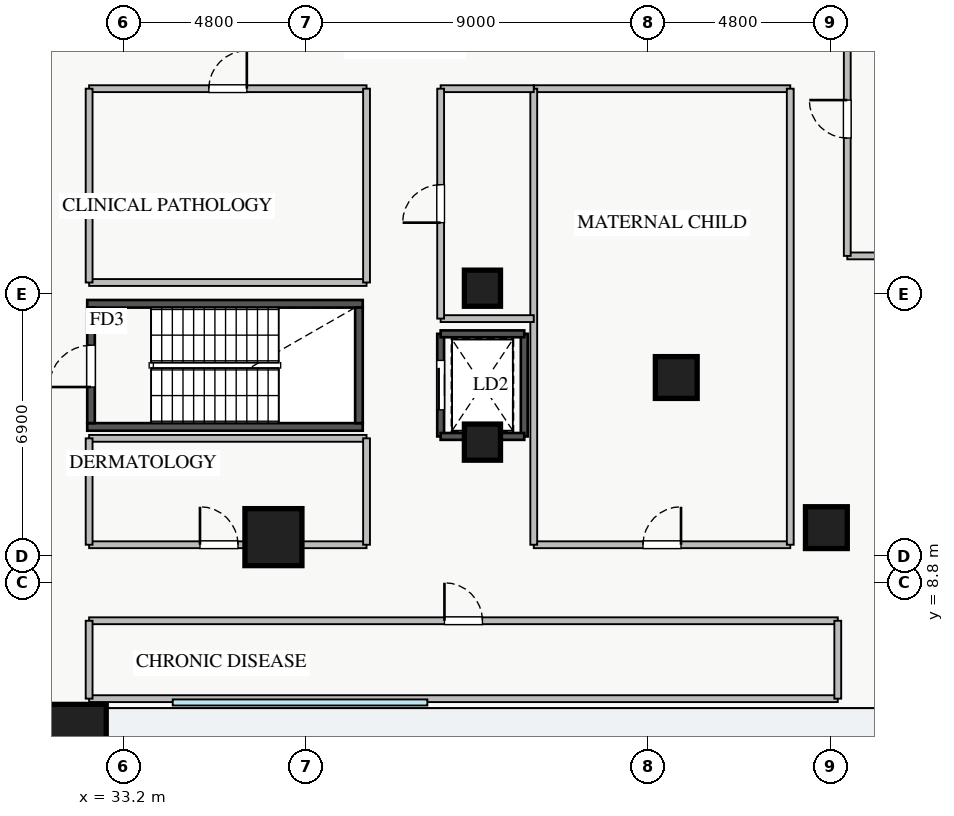
"""IFC4 building model, lengths in metres.
Left out: names, types, materials, properties, quantities, classifications, styles, units other than length and angle.
Written with IfcOpenShell. Run it as: python <this file> out.ifc"""

import sys

from ifc_helpers import new_model, si_unit, direction, frame, frame_2d, origin, origin_2d, place, context, subcontext, project, spatial, rectangle, extrude, source, transform, mapped, element, fill, save


model = new_model("IFC4")
c1 = context("Model", 3, precision=1e-05, world=origin(), true_north=direction((0.0, 1.0)))
c2 = subcontext(c1, "Body", "Model", "MODEL_VIEW")
j1 = project(units=[si_unit("LENGTHUNIT", "METRE"), si_unit("PLANEANGLEUNIT", "RADIAN")], contexts=[c1])
p1 = place(None, origin())
s1 = spatial("IfcSite", under=j1, at=p1, CompositionType="ELEMENT")
p2 = place(p1, origin())
s2 = spatial("IfcBuilding", under=s1, at=p2, CompositionType="ELEMENT")
p3 = place(p2, frame((0.0, 0.0, 13.8)))
s3 = spatial("IfcBuildingStorey", under=s2, at=p3, CompositionType="ELEMENT", Elevation=13.8)
p4 = place(p3, frame((41.55, 12.65, 0.0), z_axis=(0.0, 0.0, 1.0), x_axis=(0.0, 1.0, 0.0)))
e1 = element("IfcWall", 1, at=p4, inside=s3, PredefinedType="SHEAR", context=c2, shape_type="SweptSolid", body=[
    extrude(rectangle(XDim=2.7, YDim=0.18, at=frame_2d((1.35, 0.0))), origin(), (0.0, 0.0, 1.0), 4.15),
])
p5 = place(p4, frame((0.7, 0.0, 0.0)))
e2 = element("IfcOpeningElement", 2, at=p5, cuts=e1, PredefinedType="OPENING", context=c2, shape_type="SweptSolid", body=[
    extrude(rectangle(XDim=1.3, YDim=2.05, at=frame_2d((0.65, 1.025))), frame((0.0, 0.1, 0.0), z_axis=(0.0, -1.0, 0.0), x_axis=(1.0, 0.0, 0.0)), (0.0, 0.0, 1.0), 0.2),
])
p6 = place(p3, frame((43.75, 12.65, 0.0), z_axis=(0.0, 0.0, 1.0), x_axis=(0.0, 1.0, 0.0)))
e3 = element("IfcWall", 3, at=p6, inside=s3, PredefinedType="SHEAR", context=c2, shape_type="SweptSolid", body=[
    extrude(rectangle(XDim=2.7, YDim=0.18, at=frame_2d((1.35, 0.0))), origin(), (0.0, 0.0, 1.0), 4.15),
])
for number, where, z_axis, x_axis in (
    (4, (41.55, 12.65, 0.0), (0.0, 0.0, 1.0), (1.0, 0.0, 0.0)),
    (5, (41.55, 15.35, 0.0), (0.0, 0.0, 1.0), (1.0, 0.0, 0.0)),
):
    element("IfcWall", number, at=place(p3, frame(where, z_axis=z_axis, x_axis=x_axis)), inside=s3, PredefinedType="SHEAR", context=c2, shape_type="SweptSolid", body=[
        extrude(rectangle(XDim=2.2, YDim=0.18, at=frame_2d((1.1, 0.0))), origin(), (0.0, 0.0, 1.0), 4.15),
    ])
for number, where, z_axis, x_axis in (
    (6, (32.25, 12.9, 0.0), (0.0, 0.0, 1.0), (1.0, 0.0, 0.0)),
    (7, (32.25, 16.14, 0.0), (0.0, 0.0, 1.0), (1.0, 0.0, 0.0)),
):
    element("IfcWall", number, at=place(p3, frame(where, z_axis=z_axis, x_axis=x_axis)), inside=s3, PredefinedType="SHEAR", context=c2, shape_type="SweptSolid", body=[
        extrude(rectangle(XDim=7.25, YDim=0.2, at=frame_2d((3.625, 0.0))), origin(), (0.0, 0.0, 1.0), 4.4),
    ])
p7 = place(p3, frame((32.35, 13.0, 0.0), z_axis=(0.0, 0.0, 1.0), x_axis=(0.0, 1.0, 0.0)))
e8 = element("IfcWall", 8, at=p7, inside=s3, PredefinedType="SHEAR", context=c2, shape_type="SweptSolid", body=[
    extrude(rectangle(XDim=3.04, YDim=0.2, at=frame_2d((1.52, 0.0))), origin(), (0.0, 0.0, 1.0), 4.4),
])
p8 = place(p7, frame((0.95, 0.0, 0.0)))
e9 = element("IfcOpeningElement", 9, at=p8, cuts=e8, PredefinedType="OPENING", context=c2, shape_type="SweptSolid", body=[
    extrude(rectangle(XDim=1.1, YDim=2.05, at=frame_2d((0.55, 1.025))), frame((0.0, 0.11, 0.0), z_axis=(0.0, -1.0, 0.0), x_axis=(1.0, 0.0, 0.0)), (0.0, 0.0, 1.0), 0.22),
])
p9 = place(p3, frame((39.4, 13.0, 0.0), z_axis=(0.0, 0.0, 1.0), x_axis=(0.0, 1.0, 0.0)))
e10 = element("IfcWall", 10, at=p9, inside=s3, PredefinedType="SHEAR", context=c2, shape_type="SweptSolid", body=[
    extrude(rectangle(XDim=3.04, YDim=0.2, at=frame_2d((1.52, 0.0))), origin(), (0.0, 0.0, 1.0), 4.4),
])
m1 = source(origin(), c2, "Body", "SweptSolid", [
    extrude(rectangle(XDim=1.5, YDim=1.5, at=origin_2d()), origin(), (0.0, 0.0, 1.0), 4.4),
])
for number, where, z_axis, x_axis in (
    (11, (32.0, 4.85, 0.0), (0.0, 0.0, 1.0), (1.0, 0.0, 0.0)),
    (12, (37.15, 10.0, 0.0), (0.0, 0.0, 1.0), (1.0, 0.0, 0.0)),
):
    element("IfcColumn", number, at=place(p3, frame(where, z_axis=z_axis, x_axis=x_axis)), inside=s3, PredefinedType="COLUMN", context=c2, shape_type="MappedRepresentation", body=[
        mapped(m1, transform((0.0, 0.0, 0.0), x_axis=(1.0, 0.0, 0.0), y_axis=(0.0, 1.0, 0.0), z_axis=(0.0, 0.0, 1.0), scale=1.0)),
    ])
m2 = source(origin(), c2, "Body", "SweptSolid", [
    extrude(rectangle(XDim=1.1, YDim=1.1, at=origin_2d()), origin(), (0.0, 0.0, 1.0), 4.4),
])
for number, where, z_axis, x_axis in (
    (13, (51.7, 10.25, 0.0), (0.0, 0.0, 1.0), (1.0, 0.0, 0.0)),
    (14, (47.75, 14.2, 0.0), (0.0, 0.0, 1.0), (1.0, 0.0, 0.0)),
):
    element("IfcColumn", number, at=place(p3, frame(where, z_axis=z_axis, x_axis=x_axis)), inside=s3, PredefinedType="COLUMN", context=c2, shape_type="MappedRepresentation", body=[
        mapped(m2, transform((0.0, 0.0, 0.0), x_axis=(1.0, 0.0, 0.0), y_axis=(0.0, 1.0, 0.0), z_axis=(0.0, 0.0, 1.0), scale=1.0)),
    ])
m3 = source(origin(), c2, "Body", "SweptSolid", [
    extrude(rectangle(XDim=0.95, YDim=0.95, at=origin_2d()), origin(), (0.0, 0.0, 1.0), 4.4),
])
for number, where, z_axis, x_axis in (
    (15, (42.65, 12.5, 0.0), (0.0, 0.0, 1.0), (1.0, 0.0, 0.0)),
    (16, (42.65, 16.55, 0.0), (0.0, 0.0, 1.0), (1.0, 0.0, 0.0)),
):
    element("IfcColumn", number, at=place(p3, frame(where, z_axis=z_axis, x_axis=x_axis)), inside=s3, PredefinedType="COLUMN", context=c2, shape_type="MappedRepresentation", body=[
        mapped(m3, transform((0.0, 0.0, 0.0), x_axis=(1.0, 0.0, 0.0), y_axis=(0.0, 1.0, 0.0), z_axis=(0.0, 0.0, 1.0), scale=1.0)),
    ])
p10 = place(p3, frame((32.3, 16.7, 0.0), z_axis=(0.0, 0.0, 1.0), x_axis=(1.0, 0.0, 0.0)))
e17 = element("IfcWall", 17, at=p10, inside=s3, PredefinedType="PARTITIONING", context=c2, shape_type="SweptSolid", body=[
    extrude(rectangle(XDim=7.3, YDim=0.18, at=frame_2d((3.65, 0.0))), origin(), (0.0, 0.0, 1.0), 3.445),
])
p11 = place(p3, frame((32.3, 21.8, 0.0), z_axis=(0.0, 0.0, 1.0), x_axis=(1.0, 0.0, 0.0)))
e18 = element("IfcWall", 18, at=p11, inside=s3, PredefinedType="PARTITIONING", context=c2, shape_type="SweptSolid", body=[
    extrude(rectangle(XDim=7.3, YDim=0.18, at=frame_2d((3.65, 0.0))), origin(), (0.0, 0.0, 1.0), 4.15),
])
p12 = place(p11, frame((3.15, 0.0, 0.0)))
e19 = element("IfcOpeningElement", 19, at=p12, cuts=e18, PredefinedType="OPENING", context=c2, shape_type="SweptSolid", body=[
    extrude(rectangle(XDim=1.0, YDim=2.05, at=frame_2d((0.5, 1.025))), frame((0.0, 0.1, 0.0), z_axis=(0.0, -1.0, 0.0), x_axis=(1.0, 0.0, 0.0)), (0.0, 0.0, 1.0), 0.2),
])
for number, where, z_axis, x_axis in (
    (20, (32.3, 16.7, 0.0), (0.0, 0.0, 1.0), (0.0, 1.0, 0.0)),
    (21, (39.6, 16.7, 0.0), (0.0, 0.0, 1.0), (0.0, 1.0, 0.0)),
):
    element("IfcWall", number, at=place(p3, frame(where, z_axis=z_axis, x_axis=x_axis)), inside=s3, PredefinedType="PARTITIONING", context=c2, shape_type="SweptSolid", body=[
        extrude(rectangle(XDim=5.1, YDim=0.18, at=frame_2d((2.55, 0.0))), origin(), (0.0, 0.0, 1.0), 4.15),
    ])
p13 = place(p3, frame((32.3, 9.8, 0.0), z_axis=(0.0, 0.0, 1.0), x_axis=(1.0, 0.0, 0.0)))
e22 = element("IfcWall", 22, at=p13, inside=s3, PredefinedType="PARTITIONING", context=c2, shape_type="SweptSolid", body=[
    extrude(rectangle(XDim=7.3, YDim=0.18, at=frame_2d((3.65, 0.0))), origin(), (0.0, 0.0, 1.0), 4.15),
])
p14 = place(p13, frame((2.917, 0.0, 0.0)))
e23 = element("IfcOpeningElement", 23, at=p14, cuts=e22, PredefinedType="OPENING", context=c2, shape_type="SweptSolid", body=[
    extrude(rectangle(XDim=1.0, YDim=2.05, at=frame_2d((0.5, 1.025))), frame((0.0, 0.1, 0.0), z_axis=(0.0, -1.0, 0.0), x_axis=(1.0, 0.0, 0.0)), (0.0, 0.0, 1.0), 0.2),
])
p15 = place(p3, frame((32.3, 12.6, 0.0), z_axis=(0.0, 0.0, 1.0), x_axis=(1.0, 0.0, 0.0)))
e24 = element("IfcWall", 24, at=p15, inside=s3, PredefinedType="PARTITIONING", context=c2, shape_type="SweptSolid", body=[
    extrude(rectangle(XDim=7.3, YDim=0.18, at=frame_2d((3.65, 0.0))), origin(), (0.0, 0.0, 1.0), 3.445),
])
for number, where, z_axis, x_axis in (
    (25, (32.3, 9.8, 0.0), (0.0, 0.0, 1.0), (0.0, 1.0, 0.0)),
    (26, (39.6, 9.8, 0.0), (0.0, 0.0, 1.0), (0.0, 1.0, 0.0)),
):
    element("IfcWall", number, at=place(p3, frame(where, z_axis=z_axis, x_axis=x_axis)), inside=s3, PredefinedType="PARTITIONING", context=c2, shape_type="SweptSolid", body=[
        extrude(rectangle(XDim=2.8, YDim=0.18, at=frame_2d((1.4, 0.0))), origin(), (0.0, 0.0, 1.0), 4.15),
    ])
p16 = place(p3, frame((44.0, 9.8, 0.0), z_axis=(0.0, 0.0, 1.0), x_axis=(1.0, 0.0, 0.0)))
e27 = element("IfcWall", 27, at=p16, inside=s3, PredefinedType="PARTITIONING", context=c2, shape_type="SweptSolid", body=[
    extrude(rectangle(XDim=6.75, YDim=0.18, at=frame_2d((3.375, 0.0))), origin(), (0.0, 0.0, 1.0), 4.15),
])
p17 = place(p16, frame((2.875, 0.0, 0.0)))
e28 = element("IfcOpeningElement", 28, at=p17, cuts=e27, PredefinedType="OPENING", context=c2, shape_type="SweptSolid", body=[
    extrude(rectangle(XDim=1.0, YDim=2.05, at=frame_2d((0.5, 1.025))), frame((0.0, 0.1, 0.0), z_axis=(0.0, -1.0, 0.0), x_axis=(1.0, 0.0, 0.0)), (0.0, 0.0, 1.0), 0.2),
])
p18 = place(p3, frame((44.0, 21.8, 0.0), z_axis=(0.0, 0.0, 1.0), x_axis=(1.0, 0.0, 0.0)))
e29 = element("IfcWall", 29, at=p18, inside=s3, PredefinedType="PARTITIONING", context=c2, shape_type="SweptSolid", body=[
    extrude(rectangle(XDim=6.75, YDim=0.18, at=frame_2d((3.375, 0.0))), origin(), (0.0, 0.0, 1.0), 4.15),
])
for number, where, z_axis, x_axis in (
    (30, (44.0, 9.8, 0.0), (0.0, 0.0, 1.0), (0.0, 1.0, 0.0)),
    (31, (50.75, 9.8, 0.0), (0.0, 0.0, 1.0), (0.0, 1.0, 0.0)),
):
    element("IfcWall", number, at=place(p3, frame(where, z_axis=z_axis, x_axis=x_axis)), inside=s3, PredefinedType="PARTITIONING", context=c2, shape_type="SweptSolid", body=[
        extrude(rectangle(XDim=12.0, YDim=0.18, at=frame_2d((6.0, 0.0))), origin(), (0.0, 0.0, 1.0), 4.15),
    ])
for number, where, z_axis, x_axis in (
    (32, (41.55, 15.75, 0.0), (0.0, 0.0, 1.0), (1.0, 0.0, 0.0)),
    (33, (41.55, 21.8, 0.0), (0.0, 0.0, 1.0), (1.0, 0.0, 0.0)),
):
    element("IfcWall", number, at=place(p3, frame(where, z_axis=z_axis, x_axis=x_axis)), inside=s3, PredefinedType="PARTITIONING", context=c2, shape_type="SweptSolid", body=[
        extrude(rectangle(XDim=2.45, YDim=0.18, at=frame_2d((1.225, 0.0))), origin(), (0.0, 0.0, 1.0), 4.15),
    ])
p19 = place(p3, frame((41.55, 15.75, 0.0), z_axis=(0.0, 0.0, 1.0), x_axis=(0.0, 1.0, 0.0)))
e34 = element("IfcWall", 34, at=p19, inside=s3, PredefinedType="PARTITIONING", context=c2, shape_type="SweptSolid", body=[
    extrude(rectangle(XDim=6.05, YDim=0.18, at=frame_2d((3.025, 0.0))), origin(), (0.0, 0.0, 1.0), 4.15),
])
p20 = place(p19, frame((2.525, 0.0, 0.0)))
e35 = element("IfcOpeningElement", 35, at=p20, cuts=e34, PredefinedType="OPENING", context=c2, shape_type="SweptSolid", body=[
    extrude(rectangle(XDim=1.0, YDim=2.05, at=frame_2d((0.5, 1.025))), frame((0.0, 0.1, 0.0), z_axis=(0.0, -1.0, 0.0), x_axis=(1.0, 0.0, 0.0)), (0.0, 0.0, 1.0), 0.2),
])
p21 = place(p3, frame((52.25, 17.4, 0.0), z_axis=(0.0, 0.0, 1.0), x_axis=(1.0, 0.0, 0.0)))
e36 = element("IfcWall", 36, at=p21, inside=s3, PredefinedType="PARTITIONING", context=c2, shape_type="SweptSolid", body=[
    extrude(rectangle(XDim=2.05, YDim=0.18, at=frame_2d((1.025, 0.0))), origin(), (0.0, 0.0, 1.0), 4.15),
])
p22 = place(p3, frame((52.25, 17.4, 0.0), z_axis=(0.0, 0.0, 1.0), x_axis=(0.0, 1.0, 0.0)))
e37 = element("IfcWall", 37, at=p22, inside=s3, PredefinedType="PARTITIONING", context=c2, shape_type="SweptSolid", body=[
    extrude(rectangle(XDim=7.2, YDim=0.18, at=frame_2d((3.6, 0.0))), origin(), (0.0, 0.0, 1.0), 4.15),
])
p23 = place(p22, frame((3.1, 0.0, 0.0)))
e38 = element("IfcOpeningElement", 38, at=p23, cuts=e37, PredefinedType="OPENING", context=c2, shape_type="SweptSolid", body=[
    extrude(rectangle(XDim=1.0, YDim=2.05, at=frame_2d((0.5, 1.025))), frame((0.0, 0.1, 0.0), z_axis=(0.0, -1.0, 0.0), x_axis=(1.0, 0.0, 0.0)), (0.0, 0.0, 1.0), 0.2),
])
p24 = place(p3, frame((32.3, 5.75, 0.0), z_axis=(0.0, 0.0, 1.0), x_axis=(1.0, 0.0, 0.0)))
e39 = element("IfcWall", 39, at=p24, inside=s3, PredefinedType="PARTITIONING", context=c2, shape_type="SweptSolid", body=[
    extrude(rectangle(XDim=19.7, YDim=0.18, at=frame_2d((9.85, 0.0))), origin(), (0.0, 0.0, 1.0), 4.15),
])
p25 = place(p3, frame((32.3, 7.8, 0.0), z_axis=(0.0, 0.0, 1.0), x_axis=(1.0, 0.0, 0.0)))
e40 = element("IfcWall", 40, at=p25, inside=s3, PredefinedType="PARTITIONING", context=c2, shape_type="SweptSolid", body=[
    extrude(rectangle(XDim=19.7, YDim=0.18, at=frame_2d((9.85, 0.0))), origin(), (0.0, 0.0, 1.0), 4.15),
])
p26 = place(p25, frame((9.35, 0.0, 0.0)))
e41 = element("IfcOpeningElement", 41, at=p26, cuts=e40, PredefinedType="OPENING", context=c2, shape_type="SweptSolid", body=[
    extrude(rectangle(XDim=1.0, YDim=2.05, at=frame_2d((0.5, 1.025))), frame((0.0, 0.1, 0.0), z_axis=(0.0, -1.0, 0.0), x_axis=(1.0, 0.0, 0.0)), (0.0, 0.0, 1.0), 0.2),
])
for number, where, z_axis, x_axis in (
    (42, (32.3, 5.75, 0.0), (0.0, 0.0, 1.0), (0.0, 1.0, 0.0)),
    (43, (52.0, 5.75, 0.0), (0.0, 0.0, 1.0), (0.0, 1.0, 0.0)),
):
    element("IfcWall", number, at=place(p3, frame(where, z_axis=z_axis, x_axis=x_axis)), inside=s3, PredefinedType="PARTITIONING", context=c2, shape_type="SweptSolid", body=[
        extrude(rectangle(XDim=2.05, YDim=0.18, at=frame_2d((1.025, 0.0))), origin(), (0.0, 0.0, 1.0), 4.15),
    ])
m4 = source(origin(), c2, "Body", "SweptSolid", [
    extrude(rectangle(XDim=1.1, YDim=2.05, at=frame_2d((0.55, 1.025))), frame((0.0, 0.025, 0.0), z_axis=(0.0, -1.0, 0.0), x_axis=(1.0, 0.0, 0.0)), (0.0, 0.0, 1.0), 0.05),
])
p27 = place(p8, origin())
e44 = element("IfcDoor", 44, at=p27, inside=s3, OperationType="SINGLE_SWING_LEFT", PredefinedType="DOOR", context=c2, shape_type="MappedRepresentation", body=[
    mapped(m4, transform((0.0, 0.0, 0.0), x_axis=(1.0, 0.0, 0.0), y_axis=(0.0, 1.0, 0.0), z_axis=(0.0, 0.0, 1.0), scale=1.0)),
])
fill(e9, e44)
m5 = source(origin(), c2, "Body", "SweptSolid", [
    extrude(rectangle(XDim=1.3, YDim=2.05, at=frame_2d((0.65, 1.025))), frame((0.0, 0.025, 0.0), z_axis=(0.0, -1.0, 0.0), x_axis=(1.0, 0.0, 0.0)), (0.0, 0.0, 1.0), 0.05),
])
p28 = place(p5, origin())
e45 = element("IfcDoor", 45, at=p28, inside=s3, OperationType="SLIDING_TO_LEFT", PredefinedType="DOOR", context=c2, shape_type="MappedRepresentation", body=[
    mapped(m5, transform((0.0, 0.0, 0.0), x_axis=(1.0, 0.0, 0.0), y_axis=(0.0, 1.0, 0.0), z_axis=(0.0, 0.0, 1.0), scale=1.0)),
])
fill(e2, e45)
m6 = source(origin(), c2, "Body", "SweptSolid", [
    extrude(rectangle(XDim=1.0, YDim=2.05, at=frame_2d((0.5, 1.025))), frame((0.0, 0.025, 0.0), z_axis=(0.0, -1.0, 0.0), x_axis=(1.0, 0.0, 0.0)), (0.0, 0.0, 1.0), 0.05),
])
p29 = place(p12, origin())
e46 = element("IfcDoor", 46, at=p29, inside=s3, OperationType="SINGLE_SWING_RIGHT", PredefinedType="DOOR", context=c2, shape_type="MappedRepresentation", body=[
    mapped(m6, transform((0.0, 0.0, 0.0), x_axis=(1.0, 0.0, 0.0), y_axis=(0.0, 1.0, 0.0), z_axis=(0.0, 0.0, 1.0), scale=1.0)),
])
fill(e19, e46)
p30 = place(p14, origin())
e47 = element("IfcDoor", 47, at=p30, inside=s3, OperationType="SINGLE_SWING_LEFT", PredefinedType="DOOR", context=c2, shape_type="MappedRepresentation", body=[
    mapped(m6, transform((0.0, 0.0, 0.0), x_axis=(1.0, 0.0, 0.0), y_axis=(0.0, 1.0, 0.0), z_axis=(0.0, 0.0, 1.0), scale=1.0)),
])
fill(e23, e47)
p31 = place(p17, origin())
e48 = element("IfcDoor", 48, at=p31, inside=s3, OperationType="SINGLE_SWING_RIGHT", PredefinedType="DOOR", context=c2, shape_type="MappedRepresentation", body=[
    mapped(m6, transform((0.0, 0.0, 0.0), x_axis=(1.0, 0.0, 0.0), y_axis=(0.0, 1.0, 0.0), z_axis=(0.0, 0.0, 1.0), scale=1.0)),
])
fill(e28, e48)
p32 = place(p20, origin())
e49 = element("IfcDoor", 49, at=p32, inside=s3, OperationType="SINGLE_SWING_LEFT", PredefinedType="DOOR", context=c2, shape_type="MappedRepresentation", body=[
    mapped(m6, transform((0.0, 0.0, 0.0), x_axis=(1.0, 0.0, 0.0), y_axis=(0.0, 1.0, 0.0), z_axis=(0.0, 0.0, 1.0), scale=1.0)),
])
fill(e35, e49)
p33 = place(p23, origin())
e50 = element("IfcDoor", 50, at=p33, inside=s3, OperationType="SINGLE_SWING_RIGHT", PredefinedType="DOOR", context=c2, shape_type="MappedRepresentation", body=[
    mapped(m6, transform((0.0, 0.0, 0.0), x_axis=(1.0, 0.0, 0.0), y_axis=(0.0, 1.0, 0.0), z_axis=(0.0, 0.0, 1.0), scale=1.0)),
])
fill(e38, e50)
p34 = place(p26, origin())
e51 = element("IfcDoor", 51, at=p34, inside=s3, OperationType="SINGLE_SWING_LEFT", PredefinedType="DOOR", context=c2, shape_type="MappedRepresentation", body=[
    mapped(m6, transform((0.0, 0.0, 0.0), x_axis=(1.0, 0.0, 0.0), y_axis=(0.0, 1.0, 0.0), z_axis=(0.0, 0.0, 1.0), scale=1.0)),
])
fill(e41, e51)
save(model, sys.argv[1])
